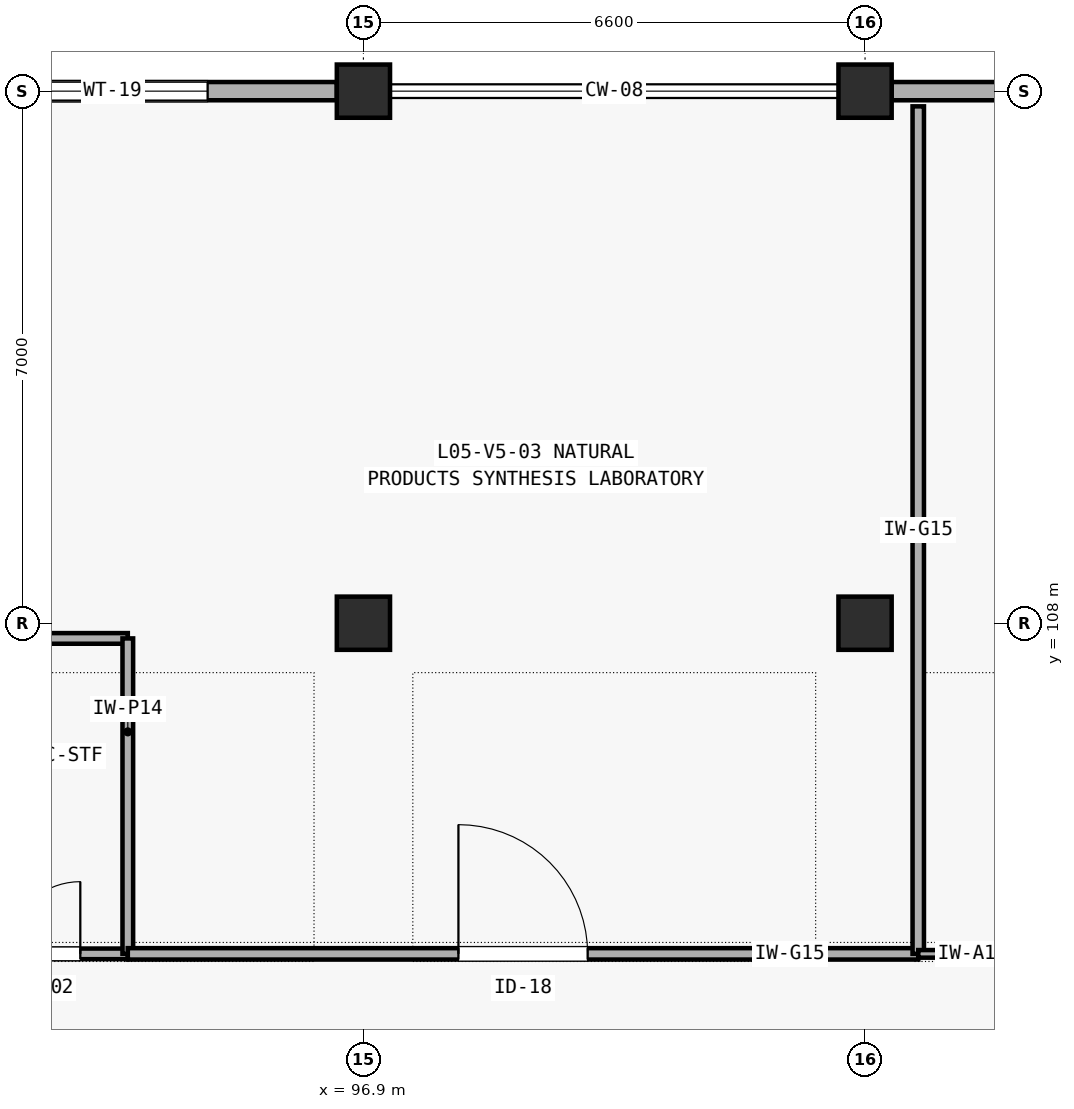
"""IFC4 building model, lengths in metres.
Left out: names, types, materials, properties, quantities, classifications, styles, units other than length and angle.
Written with IfcOpenShell. Run it as: python <this file> out.ifc"""

import sys

from ifc_helpers import new_model, si_unit, direction, frame, frame_2d, origin, origin_2d, place, context, subcontext, project, spatial, rectangle, extrude, element, fill, save


model = new_model("IFC4")
c1 = context("Model", 3, precision=1e-05, world=origin(), true_north=direction((0.0, 1.0)))
c2 = subcontext(c1, "Body", "Model", "MODEL_VIEW")
j1 = project(units=[si_unit("LENGTHUNIT", "METRE"), si_unit("PLANEANGLEUNIT", "RADIAN")], contexts=[c1])
p1 = place(None, origin())
s1 = spatial("IfcSite", under=j1, at=p1, CompositionType="ELEMENT")
p2 = place(p1, origin())
s2 = spatial("IfcBuilding", under=s1, at=p2, CompositionType="ELEMENT")
p3 = place(p2, frame((0.0, 0.0, 21.0)))
s3 = spatial("IfcBuildingStorey", under=s2, at=p3, CompositionType="ELEMENT", Elevation=21.0)
for number, where, z_axis, x_axis in (
    (1, (96.9, 108.0, 0.0), (0.0, 0.0, 1.0), (1.0, 0.0, 0.0)),
    (2, (96.9, 115.0, 0.0), (0.0, 0.0, 1.0), (1.0, 0.0, 0.0)),
    (3, (103.5, 108.0, 0.0), (0.0, 0.0, 1.0), (1.0, 0.0, 0.0)),
    (4, (103.5, 115.0, 0.0), (0.0, 0.0, 1.0), (1.0, 0.0, 0.0)),
):
    element("IfcColumn", number, at=place(p3, frame(where, z_axis=z_axis, x_axis=x_axis)), inside=s3, PredefinedType="COLUMN", context=c2, shape_type="SweptSolid", body=[
        extrude(rectangle(XDim=0.7, YDim=0.7, at=origin_2d()), origin(), (0.0, 0.0, 1.0), 4.2),
    ])
p4 = place(p3, frame((90.65, 115.0, 0.0), z_axis=(0.0, 0.0, 1.0), x_axis=(1.0, 0.0, 0.0)))
e5 = element("IfcWall", 5, at=p4, inside=s3, PredefinedType="SOLIDWALL", context=c2, shape_type="SweptSolid", body=[
    extrude(rectangle(XDim=5.9, YDim=0.24, at=frame_2d((2.95, 0.0))), origin(), (0.0, 0.0, 1.0), 3.135),
])
p5 = place(p4, frame((1.7, 0.0, 0.85)))
e6 = element("IfcOpeningElement", 6, at=p5, cuts=e5, PredefinedType="OPENING", context=c2, shape_type="SweptSolid", body=[
    extrude(rectangle(XDim=2.5, YDim=1.25, at=frame_2d((1.25, 0.625))), frame((0.0, 0.13, 0.0), z_axis=(0.0, -1.0, 0.0), x_axis=(1.0, 0.0, 0.0)), (0.0, 0.0, 1.0), 0.26),
])
p6 = place(p3, frame((103.85, 115.0, 0.0), z_axis=(0.0, 0.0, 1.0), x_axis=(1.0, 0.0, 0.0)))
e7 = element("IfcWall", 7, at=p6, inside=s3, PredefinedType="SOLIDWALL", context=c2, shape_type="SweptSolid", body=[
    extrude(rectangle(XDim=5.9, YDim=0.24, at=frame_2d((2.95, 0.0))), origin(), (0.0, 0.0, 1.0), 3.285),
])
p7 = place(p6, frame((1.9, 0.0, 0.85)))
e8 = element("IfcOpeningElement", 8, at=p7, cuts=e7, PredefinedType="OPENING", context=c2, shape_type="SweptSolid", body=[
    extrude(rectangle(XDim=2.1, YDim=1.6, at=frame_2d((1.05, 0.8))), frame((0.0, 0.13, 0.0), z_axis=(0.0, -1.0, 0.0), x_axis=(1.0, 0.0, 0.0)), (0.0, 0.0, 1.0), 0.26),
])
p8 = place(p3, frame((91.6, 103.65, 0.0), z_axis=(0.0, 0.0, 1.0), x_axis=(1.0, 0.0, 0.0)))
e9 = element("IfcWall", 9, at=p8, inside=s3, PredefinedType="PLUMBINGWALL", context=c2, shape_type="SweptSolid", body=[
    extrude(rectangle(XDim=2.2, YDim=0.14, at=frame_2d((1.1, 0.0))), origin(), (0.0, 0.0, 1.0), 3.9),
])
p9 = place(p8, frame((0.625, 0.0, 0.0)))
e10 = element("IfcOpeningElement", 10, at=p9, cuts=e9, PredefinedType="OPENING", context=c2, shape_type="SweptSolid", body=[
    extrude(rectangle(XDim=0.95, YDim=2.1, at=frame_2d((0.475, 1.05))), frame((0.0, 0.08, 0.0), z_axis=(0.0, -1.0, 0.0), x_axis=(1.0, 0.0, 0.0)), (0.0, 0.0, 1.0), 0.16),
])
p10 = place(p3, frame((91.6, 107.8, 0.0), z_axis=(0.0, 0.0, 1.0), x_axis=(1.0, 0.0, 0.0)))
e11 = element("IfcWall", 11, at=p10, inside=s3, PredefinedType="PLUMBINGWALL", context=c2, shape_type="SweptSolid", body=[
    extrude(rectangle(XDim=2.2, YDim=0.14, at=frame_2d((1.1, 0.0))), origin(), (0.0, 0.0, 1.0), 3.135),
])
p11 = place(p3, frame((93.8, 103.65, 0.0), z_axis=(0.0, 0.0, 1.0), x_axis=(0.0, 1.0, 0.0)))
e12 = element("IfcWall", 12, at=p11, inside=s3, PredefinedType="PLUMBINGWALL", context=c2, shape_type="SweptSolid", body=[
    extrude(rectangle(XDim=4.15, YDim=0.14, at=frame_2d((2.075, 0.0))), origin(), (0.0, 0.0, 1.0), 3.9),
])
p12 = place(p3, frame((93.8, 103.65, 0.0), z_axis=(0.0, 0.0, 1.0), x_axis=(1.0, 0.0, 0.0)))
e13 = element("IfcWall", 13, at=p12, inside=s3, PredefinedType="PARTITIONING", context=c2, shape_type="SweptSolid", body=[
    extrude(rectangle(XDim=10.4, YDim=0.15, at=frame_2d((5.2, 0.0))), origin(), (0.0, 0.0, 1.0), 3.9),
])
p13 = place(p12, frame((4.35, 0.0, 0.0)))
e14 = element("IfcOpeningElement", 14, at=p13, cuts=e13, PredefinedType="OPENING", context=c2, shape_type="SweptSolid", body=[
    extrude(rectangle(XDim=1.7, YDim=2.2, at=frame_2d((0.85, 1.1))), frame((0.0, 0.085, 0.0), z_axis=(0.0, -1.0, 0.0), x_axis=(1.0, 0.0, 0.0)), (0.0, 0.0, 1.0), 0.17),
])
p14 = place(p3, frame((104.2, 103.65, 0.0), z_axis=(0.0, 0.0, 1.0), x_axis=(0.0, 1.0, 0.0)))
e15 = element("IfcWall", 15, at=p14, inside=s3, PredefinedType="PARTITIONING", context=c2, shape_type="SweptSolid", body=[
    extrude(rectangle(XDim=11.15, YDim=0.15, at=frame_2d((5.575, 0.0))), origin(), (0.0, 0.0, 1.0), 3.9),
])
p15 = place(p3, frame((104.2, 103.65, 0.0), z_axis=(0.0, 0.0, 1.0), x_axis=(1.0, 0.0, 0.0)))
e16 = element("IfcWall", 16, at=p15, inside=s3, PredefinedType="PARTITIONING", context=c2, shape_type="SweptSolid", body=[
    extrude(rectangle(XDim=5.7, YDim=0.1, at=frame_2d((2.85, 0.0))), origin(), (0.0, 0.0, 1.0), 3.9),
])
p16 = place(p15, frame((2.4, 0.0, 0.0)))
e17 = element("IfcOpeningElement", 17, at=p16, cuts=e16, PredefinedType="OPENING", context=c2, shape_type="SweptSolid", body=[
    extrude(rectangle(XDim=0.9, YDim=2.1, at=frame_2d((0.45, 1.05))), frame((0.0, 0.06, 0.0), z_axis=(0.0, -1.0, 0.0), x_axis=(1.0, 0.0, 0.0)), (0.0, 0.0, 1.0), 0.12),
])
p17 = place(p5, origin())
e18 = element("IfcWindow", 18, at=p17, inside=s3, PartitioningType="SINGLE_PANEL", PredefinedType="WINDOW", context=c2, shape_type="SweptSolid", body=[
    extrude(rectangle(XDim=2.5, YDim=1.25, at=frame_2d((1.25, 0.625))), frame((0.0, 0.03, 0.0), z_axis=(0.0, -1.0, 0.0), x_axis=(1.0, 0.0, 0.0)), (0.0, 0.0, 1.0), 0.06),
])
fill(e6, e18)
p18 = place(p9, origin())
e19 = element("IfcDoor", 19, at=p18, inside=s3, OperationType="SINGLE_SWING_RIGHT", PredefinedType="DOOR", context=c2, shape_type="SweptSolid", body=[
    extrude(rectangle(XDim=0.95, YDim=2.1, at=frame_2d((0.475, 1.05))), frame((0.0, 0.025, 0.0), z_axis=(0.0, -1.0, 0.0), x_axis=(1.0, 0.0, 0.0)), (0.0, 0.0, 1.0), 0.05),
])
fill(e10, e19)
p19 = place(p13, origin())
e20 = element("IfcDoor", 20, at=p19, inside=s3, OperationType="SINGLE_SWING_LEFT", PredefinedType="DOOR", context=c2, shape_type="SweptSolid", body=[
    extrude(rectangle(XDim=1.7, YDim=2.2, at=frame_2d((0.85, 1.1))), frame((0.0, 0.025, 0.0), z_axis=(0.0, -1.0, 0.0), x_axis=(1.0, 0.0, 0.0)), (0.0, 0.0, 1.0), 0.05),
])
fill(e14, e20)
save(model, sys.argv[1])
